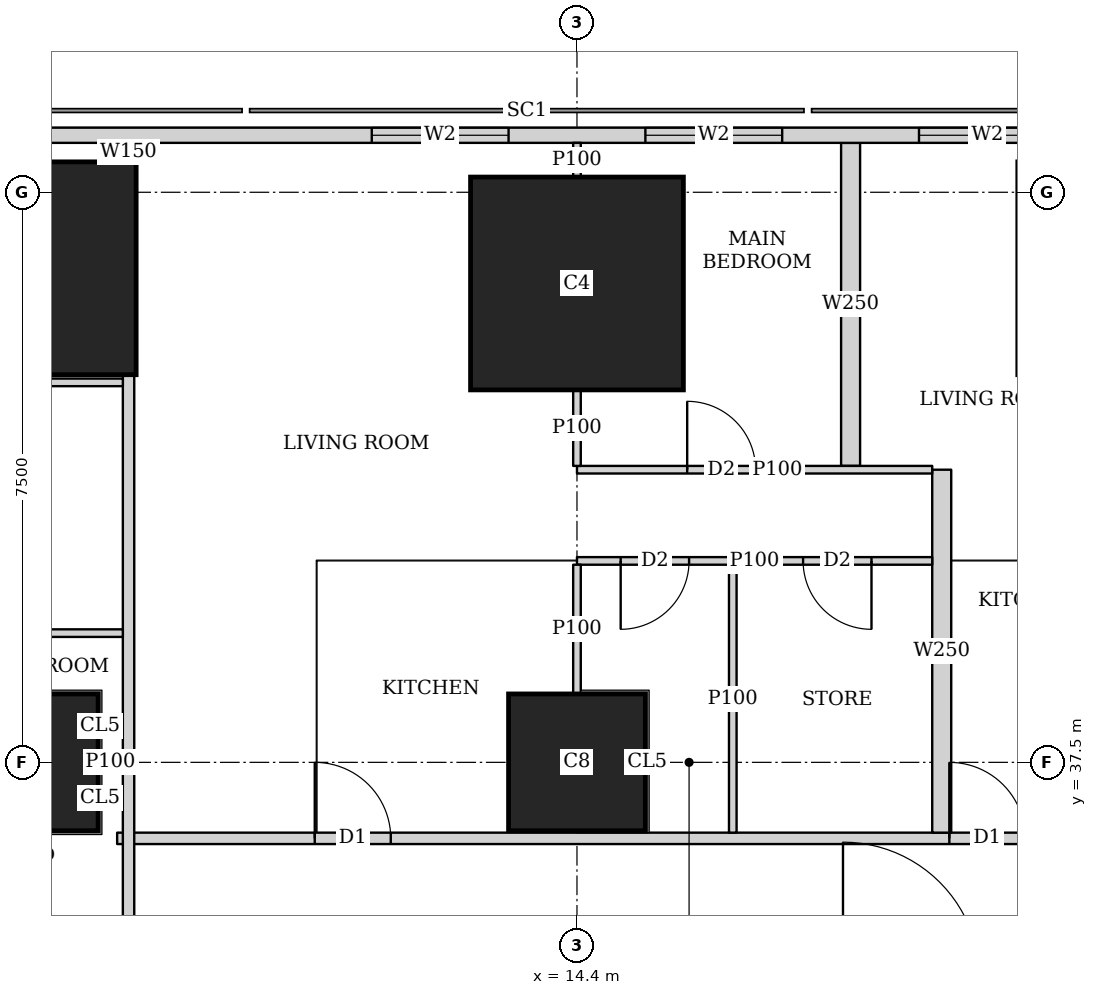
"""IFC4 building model, lengths in metres.
Left out: names, types, materials, properties, quantities, classifications, styles, units other than length and angle.
Written with IfcOpenShell. Run it as: python <this file> out.ifc"""

import sys

from ifc_helpers import new_model, si_unit, direction, frame, frame_2d, origin, origin_2d, place, context, subcontext, project, spatial, rectangle, extrude, element, fill, save


model = new_model("IFC4")
c1 = context("Model", 3, precision=1e-05, world=origin(), true_north=direction((0.0, 1.0)))
c2 = subcontext(c1, "Body", "Model", "MODEL_VIEW")
j1 = project(units=[si_unit("LENGTHUNIT", "METRE"), si_unit("PLANEANGLEUNIT", "RADIAN")], contexts=[c1])
p1 = place(None, origin())
s1 = spatial("IfcSite", under=j1, at=p1, CompositionType="ELEMENT")
p2 = place(p1, origin())
s2 = spatial("IfcBuilding", under=s1, at=p2, CompositionType="ELEMENT")
p3 = place(p2, frame((0.0, 0.0, 65.0)))
s3 = spatial("IfcBuildingStorey", under=s2, at=p3, CompositionType="ELEMENT", Elevation=65.0)
for number, where, z_axis, x_axis in (
    (1, (7.2, 37.5, 0.0), (0.0, 0.0, 1.0), (1.0, 0.0, 0.0)),
    (2, (14.4, 37.5, 0.0), (0.0, 0.0, 1.0), (1.0, 0.0, 0.0)),
):
    element("IfcColumn", number, at=place(p3, frame(where, z_axis=z_axis, x_axis=x_axis)), inside=s3, PredefinedType="COLUMN", context=c2, shape_type="SweptSolid", body=[
        extrude(rectangle(XDim=1.8, YDim=1.8, at=origin_2d()), origin(), (0.0, 0.0, 1.0), 3.75),
    ])
for number, where, z_axis, x_axis in (
    (3, (7.2, 44.0, 0.0), (0.0, 0.0, 1.0), (1.0, 0.0, 0.0)),
    (4, (14.4, 43.8, 0.0), (0.0, 0.0, 1.0), (1.0, 0.0, 0.0)),
):
    element("IfcColumn", number, at=place(p3, frame(where, z_axis=z_axis, x_axis=x_axis)), inside=s3, PredefinedType="COLUMN", context=c2, shape_type="SweptSolid", body=[
        extrude(rectangle(XDim=2.8, YDim=2.8, at=origin_2d()), origin(), (0.0, 0.0, 1.0), 3.75),
    ])
p4 = place(p3, frame((40.106, 45.75, 0.0), z_axis=(0.0, 0.0, 1.0), x_axis=(-1.0, 0.0, 0.0)))
e5 = element("IfcWall", 5, at=p4, inside=s3, PredefinedType="SOLIDWALL", context=c2, shape_type="SweptSolid", body=[
    extrude(rectangle(XDim=37.943, YDim=0.2, at=frame_2d((18.971, 0.0))), origin(), (0.0, 0.0, 1.0), 3.5),
])
p5 = place(p4, frame((8.606, 0.0, 0.9)))
e6 = element("IfcOpeningElement", 6, at=p5, cuts=e5, PredefinedType="OPENING", context=c2, shape_type="SweptSolid", body=[
    extrude(rectangle(XDim=1.8, YDim=1.5, at=frame_2d((0.9, 0.75))), frame((0.0, 0.11, 0.0), z_axis=(0.0, -1.0, 0.0), x_axis=(1.0, 0.0, 0.0)), (0.0, 0.0, 1.0), 0.22),
])
p6 = place(p4, frame((12.206, 0.0, 0.9)))
e7 = element("IfcOpeningElement", 7, at=p6, cuts=e5, PredefinedType="OPENING", context=c2, shape_type="SweptSolid", body=[
    extrude(rectangle(XDim=1.8, YDim=1.5, at=frame_2d((0.9, 0.75))), frame((0.0, 0.11, 0.0), z_axis=(0.0, -1.0, 0.0), x_axis=(1.0, 0.0, 0.0)), (0.0, 0.0, 1.0), 0.22),
])
p7 = place(p4, frame((15.806, 0.0, 0.9)))
e8 = element("IfcOpeningElement", 8, at=p7, cuts=e5, PredefinedType="OPENING", context=c2, shape_type="SweptSolid", body=[
    extrude(rectangle(XDim=1.8, YDim=1.5, at=frame_2d((0.9, 0.75))), frame((0.0, 0.11, 0.0), z_axis=(0.0, -1.0, 0.0), x_axis=(1.0, 0.0, 0.0)), (0.0, 0.0, 1.0), 0.22),
])
p8 = place(p4, frame((19.406, 0.0, 0.9)))
e9 = element("IfcOpeningElement", 9, at=p8, cuts=e5, PredefinedType="OPENING", context=c2, shape_type="SweptSolid", body=[
    extrude(rectangle(XDim=1.8, YDim=1.5, at=frame_2d((0.9, 0.75))), frame((0.0, 0.11, 0.0), z_axis=(0.0, -1.0, 0.0), x_axis=(1.0, 0.0, 0.0)), (0.0, 0.0, 1.0), 0.22),
])
p9 = place(p4, frame((23.006, 0.0, 0.9)))
e10 = element("IfcOpeningElement", 10, at=p9, cuts=e5, PredefinedType="OPENING", context=c2, shape_type="SweptSolid", body=[
    extrude(rectangle(XDim=1.8, YDim=1.5, at=frame_2d((0.9, 0.75))), frame((0.0, 0.11, 0.0), z_axis=(0.0, -1.0, 0.0), x_axis=(1.0, 0.0, 0.0)), (0.0, 0.0, 1.0), 0.22),
])
p10 = place(p4, frame((26.606, 0.0, 0.9)))
e11 = element("IfcOpeningElement", 11, at=p10, cuts=e5, PredefinedType="OPENING", context=c2, shape_type="SweptSolid", body=[
    extrude(rectangle(XDim=1.8, YDim=1.5, at=frame_2d((0.9, 0.75))), frame((0.0, 0.11, 0.0), z_axis=(0.0, -1.0, 0.0), x_axis=(1.0, 0.0, 0.0)), (0.0, 0.0, 1.0), 0.22),
])
p11 = place(p3, frame((8.5, 2.426, 0.0), z_axis=(0.0, 0.0, 1.0), x_axis=(0.0, 1.0, 0.0)))
e12 = element("IfcWall", 12, at=p11, inside=s3, PredefinedType="SOLIDWALL", context=c2, shape_type="SweptSolid", body=[
    extrude(rectangle(XDim=40.173, YDim=0.15, at=frame_2d((20.086, 0.0))), origin(), (0.0, 0.0, 1.0), 3.5),
])
p12 = place(p11, frame((6.661, 0.0, 0.0)))
e13 = element("IfcOpeningElement", 13, at=p12, cuts=e12, PredefinedType="OPENING", context=c2, shape_type="SweptSolid", body=[
    extrude(rectangle(XDim=1.0, YDim=2.1, at=frame_2d((0.5, 1.05))), frame((0.0, 0.085, 0.0), z_axis=(0.0, -1.0, 0.0), x_axis=(1.0, 0.0, 0.0)), (0.0, 0.0, 1.0), 0.17),
])
p13 = place(p11, frame((9.986, 0.0, 0.0)))
e14 = element("IfcOpeningElement", 14, at=p13, cuts=e12, PredefinedType="OPENING", context=c2, shape_type="SweptSolid", body=[
    extrude(rectangle(XDim=1.0, YDim=2.1, at=frame_2d((0.5, 1.05))), frame((0.0, 0.085, 0.0), z_axis=(0.0, -1.0, 0.0), x_axis=(1.0, 0.0, 0.0)), (0.0, 0.0, 1.0), 0.17),
])
p14 = place(p11, frame((17.487, 0.0, 0.0)))
e15 = element("IfcOpeningElement", 15, at=p14, cuts=e12, PredefinedType="OPENING", context=c2, shape_type="SweptSolid", body=[
    extrude(rectangle(XDim=1.0, YDim=2.1, at=frame_2d((0.5, 1.05))), frame((0.0, 0.085, 0.0), z_axis=(0.0, -1.0, 0.0), x_axis=(1.0, 0.0, 0.0)), (0.0, 0.0, 1.0), 0.17),
])
p15 = place(p11, frame((24.987, 0.0, 0.0)))
e16 = element("IfcOpeningElement", 16, at=p15, cuts=e12, PredefinedType="OPENING", context=c2, shape_type="SweptSolid", body=[
    extrude(rectangle(XDim=1.0, YDim=2.1, at=frame_2d((0.5, 1.05))), frame((0.0, 0.085, 0.0), z_axis=(0.0, -1.0, 0.0), x_axis=(1.0, 0.0, 0.0)), (0.0, 0.0, 1.0), 0.17),
])
p16 = place(p3, frame((8.5, 45.401, 0.0), z_axis=(0.0, 0.0, 1.0), x_axis=(0.0, 1.0, 0.0)))
e17 = element("IfcWall", 17, at=p16, inside=s3, PredefinedType="SOLIDWALL", context=c2, shape_type="SweptSolid", body=[
    extrude(rectangle(XDim=0.249, YDim=0.15, at=frame_2d((0.125, 0.0))), origin(), (0.0, 0.0, 1.0), 3.5),
])
p17 = place(p3, frame((8.35, 36.5, 0.0), z_axis=(0.0, 0.0, 1.0), x_axis=(1.0, 0.0, 0.0)))
e18 = element("IfcWall", 18, at=p17, inside=s3, PredefinedType="SOLIDWALL", context=c2, shape_type="SweptSolid", body=[
    extrude(rectangle(XDim=26.415, YDim=0.15, at=frame_2d((13.208, 0.0))), origin(), (0.0, 0.0, 1.0), 3.5),
])
p18 = place(p17, frame((2.6, 0.0, 0.0)))
e19 = element("IfcOpeningElement", 19, at=p18, cuts=e18, PredefinedType="OPENING", context=c2, shape_type="SweptSolid", body=[
    extrude(rectangle(XDim=1.0, YDim=2.1, at=frame_2d((0.5, 1.05))), frame((0.0, 0.085, 0.0), z_axis=(0.0, -1.0, 0.0), x_axis=(1.0, 0.0, 0.0)), (0.0, 0.0, 1.0), 0.17),
])
p19 = place(p17, frame((10.949, 0.0, 0.0)))
e20 = element("IfcOpeningElement", 20, at=p19, cuts=e18, PredefinedType="OPENING", context=c2, shape_type="SweptSolid", body=[
    extrude(rectangle(XDim=1.0, YDim=2.1, at=frame_2d((0.5, 1.05))), frame((0.0, 0.085, 0.0), z_axis=(0.0, -1.0, 0.0), x_axis=(1.0, 0.0, 0.0)), (0.0, 0.0, 1.0), 0.17),
])
p20 = place(p17, frame((18.149, 0.0, 0.0)))
e21 = element("IfcOpeningElement", 21, at=p20, cuts=e18, PredefinedType="OPENING", context=c2, shape_type="SweptSolid", body=[
    extrude(rectangle(XDim=1.0, YDim=2.1, at=frame_2d((0.5, 1.05))), frame((0.0, 0.085, 0.0), z_axis=(0.0, -1.0, 0.0), x_axis=(1.0, 0.0, 0.0)), (0.0, 0.0, 1.0), 0.17),
])
p21 = place(p3, frame((8.101, 37.5, 0.0), z_axis=(0.0, 0.0, 1.0), x_axis=(1.0, 0.0, 0.0)))
e22 = element("IfcWall", 22, at=p21, inside=s3, PredefinedType="PARTITIONING", context=c2, shape_type="SweptSolid", body=[
    extrude(rectangle(XDim=0.324, YDim=0.1, at=frame_2d((0.162, 0.0))), origin(), (0.0, 0.0, 1.0), 3.5),
])
p22 = place(p3, frame((4.9, 42.499, 0.0), z_axis=(0.0, 0.0, 1.0), x_axis=(1.0, 0.0, 0.0)))
e23 = element("IfcWall", 23, at=p22, inside=s3, PredefinedType="PARTITIONING", context=c2, shape_type="SweptSolid", body=[
    extrude(rectangle(XDim=3.525, YDim=0.1, at=frame_2d((1.763, 0.0))), origin(), (0.0, 0.0, 1.0), 2.05),
])
p23 = place(p3, frame((4.9, 39.2, 0.0), z_axis=(0.0, 0.0, 1.0), x_axis=(1.0, 0.0, 0.0)))
e24 = element("IfcWall", 24, at=p23, inside=s3, PredefinedType="PARTITIONING", context=c2, shape_type="SweptSolid", body=[
    extrude(rectangle(XDim=3.525, YDim=0.1, at=frame_2d((1.763, 0.0))), origin(), (0.0, 0.0, 1.0), 3.5),
])
p24 = place(p3, frame((14.4, 41.35, 0.0), z_axis=(0.0, 0.0, 1.0), x_axis=(1.0, 0.0, 0.0)))
e25 = element("IfcWall", 25, at=p24, inside=s3, PredefinedType="PARTITIONING", context=c2, shape_type="SweptSolid", body=[
    extrude(rectangle(XDim=4.674, YDim=0.1, at=frame_2d((2.337, 0.0))), origin(), (0.0, 0.0, 1.0), 3.5),
])
p25 = place(p24, frame((1.45, 0.0, 0.0)))
e26 = element("IfcOpeningElement", 26, at=p25, cuts=e25, PredefinedType="OPENING", context=c2, shape_type="SweptSolid", body=[
    extrude(rectangle(XDim=0.9, YDim=2.1, at=frame_2d((0.45, 1.05))), frame((0.0, 0.06, 0.0), z_axis=(0.0, -1.0, 0.0), x_axis=(1.0, 0.0, 0.0)), (0.0, 0.0, 1.0), 0.12),
])
p26 = place(p3, frame((14.4, 40.15, 0.0), z_axis=(0.0, 0.0, 1.0), x_axis=(1.0, 0.0, 0.0)))
e27 = element("IfcWall", 27, at=p26, inside=s3, PredefinedType="PARTITIONING", context=c2, shape_type="SweptSolid", body=[
    extrude(rectangle(XDim=4.674, YDim=0.1, at=frame_2d((2.337, 0.0))), origin(), (0.0, 0.0, 1.0), 3.5),
])
p27 = place(p26, frame((0.575, 0.0, 0.0)))
e28 = element("IfcOpeningElement", 28, at=p27, cuts=e27, PredefinedType="OPENING", context=c2, shape_type="SweptSolid", body=[
    extrude(rectangle(XDim=0.9, YDim=2.1, at=frame_2d((0.45, 1.05))), frame((0.0, 0.06, 0.0), z_axis=(0.0, -1.0, 0.0), x_axis=(1.0, 0.0, 0.0)), (0.0, 0.0, 1.0), 0.12),
])
p28 = place(p26, frame((2.975, 0.0, 0.0)))
e29 = element("IfcOpeningElement", 29, at=p28, cuts=e27, PredefinedType="OPENING", context=c2, shape_type="SweptSolid", body=[
    extrude(rectangle(XDim=0.9, YDim=2.1, at=frame_2d((0.45, 1.05))), frame((0.0, 0.06, 0.0), z_axis=(0.0, -1.0, 0.0), x_axis=(1.0, 0.0, 0.0)), (0.0, 0.0, 1.0), 0.12),
])
p29 = place(p3, frame((14.4, 41.4, 0.0), z_axis=(0.0, 0.0, 1.0), x_axis=(0.0, 1.0, 0.0)))
e30 = element("IfcWall", 30, at=p29, inside=s3, PredefinedType="PARTITIONING", context=c2, shape_type="SweptSolid", body=[
    extrude(rectangle(XDim=0.999, YDim=0.1, at=frame_2d((0.5, 0.0))), origin(), (0.0, 0.0, 1.0), 3.5),
])
p30 = place(p3, frame((14.4, 45.201, 0.0), z_axis=(0.0, 0.0, 1.0), x_axis=(0.0, 1.0, 0.0)))
e31 = element("IfcWall", 31, at=p30, inside=s3, PredefinedType="PARTITIONING", context=c2, shape_type="SweptSolid", body=[
    extrude(rectangle(XDim=0.449, YDim=0.1, at=frame_2d((0.225, 0.0))), origin(), (0.0, 0.0, 1.0), 3.5),
])
p31 = place(p3, frame((14.4, 38.401, 0.0), z_axis=(0.0, 0.0, 1.0), x_axis=(0.0, 1.0, 0.0)))
e32 = element("IfcWall", 32, at=p31, inside=s3, PredefinedType="PARTITIONING", context=c2, shape_type="SweptSolid", body=[
    extrude(rectangle(XDim=1.699, YDim=0.1, at=frame_2d((0.85, 0.0))), origin(), (0.0, 0.0, 1.0), 3.5),
])
p32 = place(p3, frame((16.45, 36.575, 0.0), z_axis=(0.0, 0.0, 1.0), x_axis=(0.0, 1.0, 0.0)))
e33 = element("IfcWall", 33, at=p32, inside=s3, PredefinedType="PARTITIONING", context=c2, shape_type="SweptSolid", body=[
    extrude(rectangle(XDim=3.525, YDim=0.1, at=frame_2d((1.763, 0.0))), origin(), (0.0, 0.0, 1.0), 3.5),
])
p33 = place(p3, frame((18.0, 41.4, 0.0), z_axis=(0.0, 0.0, 1.0), x_axis=(0.0, 1.0, 0.0)))
e34 = element("IfcWall", 34, at=p33, inside=s3, PredefinedType="SOLIDWALL", context=c2, shape_type="SweptSolid", body=[
    extrude(rectangle(XDim=4.25, YDim=0.25, at=frame_2d((2.125, 0.0))), origin(), (0.0, 0.0, 1.0), 2.05),
])
p34 = place(p3, frame((19.199, 36.575, 0.0), z_axis=(0.0, 0.0, 1.0), x_axis=(0.0, 1.0, 0.0)))
e35 = element("IfcWall", 35, at=p34, inside=s3, PredefinedType="SOLIDWALL", context=c2, shape_type="SweptSolid", body=[
    extrude(rectangle(XDim=4.775, YDim=0.25, at=frame_2d((2.388, 0.0))), origin(), (0.0, 0.0, 1.0), 3.5),
])
p35 = place(p8, origin())
e36 = element("IfcWindow", 36, at=p35, inside=s3, PartitioningType="SINGLE_PANEL", PredefinedType="WINDOW", context=c2, shape_type="SweptSolid", body=[
    extrude(rectangle(XDim=1.8, YDim=1.5, at=frame_2d((0.9, 0.75))), frame((0.0, 0.03, 0.0), z_axis=(0.0, -1.0, 0.0), x_axis=(1.0, 0.0, 0.0)), (0.0, 0.0, 1.0), 0.06),
])
fill(e9, e36)
p36 = place(p9, origin())
e37 = element("IfcWindow", 37, at=p36, inside=s3, PartitioningType="SINGLE_PANEL", PredefinedType="WINDOW", context=c2, shape_type="SweptSolid", body=[
    extrude(rectangle(XDim=1.8, YDim=1.5, at=frame_2d((0.9, 0.75))), frame((0.0, 0.03, 0.0), z_axis=(0.0, -1.0, 0.0), x_axis=(1.0, 0.0, 0.0)), (0.0, 0.0, 1.0), 0.06),
])
fill(e10, e37)
p37 = place(p10, origin())
e38 = element("IfcWindow", 38, at=p37, inside=s3, PartitioningType="SINGLE_PANEL", PredefinedType="WINDOW", context=c2, shape_type="SweptSolid", body=[
    extrude(rectangle(XDim=1.8, YDim=1.5, at=frame_2d((0.9, 0.75))), frame((0.0, 0.03, 0.0), z_axis=(0.0, -1.0, 0.0), x_axis=(1.0, 0.0, 0.0)), (0.0, 0.0, 1.0), 0.06),
])
fill(e11, e38)
p38 = place(p25, origin())
e39 = element("IfcDoor", 39, at=p38, inside=s3, OperationType="SINGLE_SWING_LEFT", PredefinedType="DOOR", context=c2, shape_type="SweptSolid", body=[
    extrude(rectangle(XDim=0.9, YDim=2.1, at=frame_2d((0.45, 1.05))), frame((0.0, 0.025, 0.0), z_axis=(0.0, -1.0, 0.0), x_axis=(1.0, 0.0, 0.0)), (0.0, 0.0, 1.0), 0.05),
])
fill(e26, e39)
p39 = place(p27, origin())
e40 = element("IfcDoor", 40, at=p39, inside=s3, OperationType="SINGLE_SWING_RIGHT", PredefinedType="DOOR", context=c2, shape_type="SweptSolid", body=[
    extrude(rectangle(XDim=0.9, YDim=2.1, at=frame_2d((0.45, 1.05))), frame((0.0, 0.025, 0.0), z_axis=(0.0, -1.0, 0.0), x_axis=(1.0, 0.0, 0.0)), (0.0, 0.0, 1.0), 0.05),
])
fill(e28, e40)
p40 = place(p28, origin())
e41 = element("IfcDoor", 41, at=p40, inside=s3, OperationType="SINGLE_SWING_LEFT", PredefinedType="DOOR", context=c2, shape_type="SweptSolid", body=[
    extrude(rectangle(XDim=0.9, YDim=2.1, at=frame_2d((0.45, 1.05))), frame((0.0, 0.025, 0.0), z_axis=(0.0, -1.0, 0.0), x_axis=(1.0, 0.0, 0.0)), (0.0, 0.0, 1.0), 0.05),
])
fill(e29, e41)
p41 = place(p18, origin())
e42 = element("IfcDoor", 42, at=p41, inside=s3, OperationType="SINGLE_SWING_LEFT", PredefinedType="DOOR", context=c2, shape_type="SweptSolid", body=[
    extrude(rectangle(XDim=1.0, YDim=2.1, at=frame_2d((0.5, 1.05))), frame((0.0, 0.025, 0.0), z_axis=(0.0, -1.0, 0.0), x_axis=(1.0, 0.0, 0.0)), (0.0, 0.0, 1.0), 0.05),
])
fill(e19, e42)
p42 = place(p19, origin())
e43 = element("IfcDoor", 43, at=p42, inside=s3, OperationType="SINGLE_SWING_LEFT", PredefinedType="DOOR", context=c2, shape_type="SweptSolid", body=[
    extrude(rectangle(XDim=1.0, YDim=2.1, at=frame_2d((0.5, 1.05))), frame((0.0, 0.025, 0.0), z_axis=(0.0, -1.0, 0.0), x_axis=(1.0, 0.0, 0.0)), (0.0, 0.0, 1.0), 0.05),
])
fill(e20, e43)
save(model, sys.argv[1])
